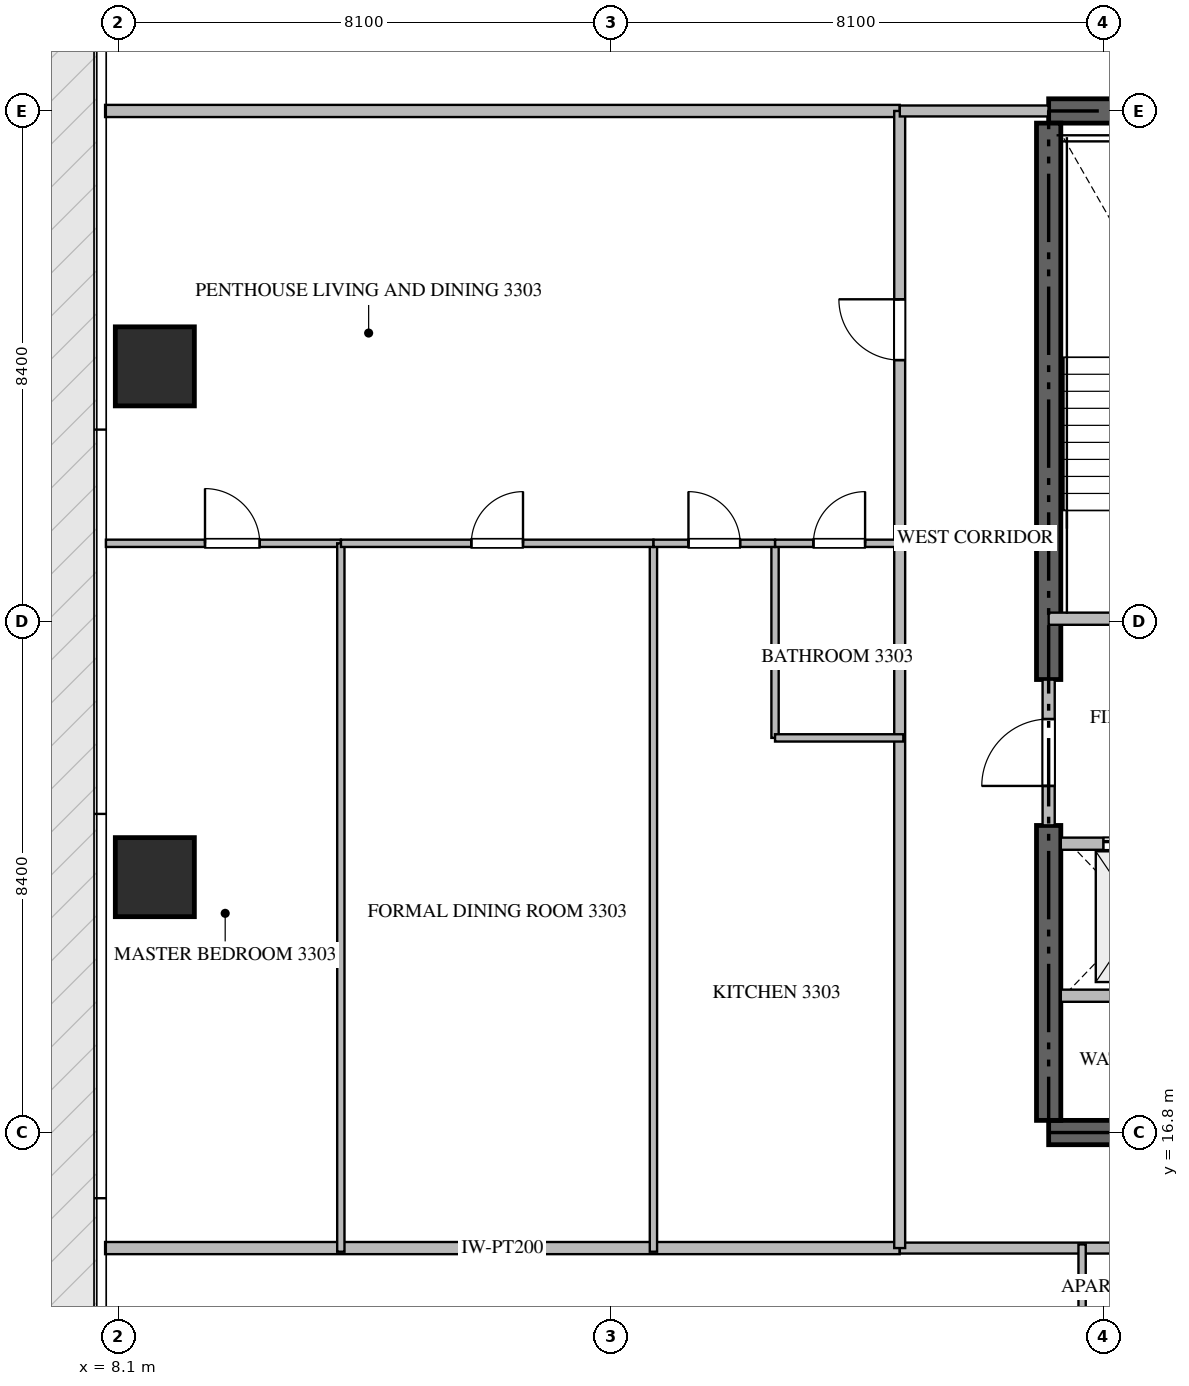
"""IFC4 building model, lengths in metres.
Left out: names, types, materials, properties, quantities, classifications, styles, units other than length and angle.
Written with IfcOpenShell. Run it as: python <this file> out.ifc"""

import sys

from ifc_helpers import new_model, si_unit, direction, frame, frame_2d, origin, origin_2d, place, context, subcontext, project, spatial, rectangle, extrude, source, transform, mapped, element, fill, save


model = new_model("IFC4")
c1 = context("Model", 3, precision=1e-05, world=origin(), true_north=direction((0.0, 1.0)))
c2 = subcontext(c1, "Body", "Model", "MODEL_VIEW")
j1 = project(units=[si_unit("LENGTHUNIT", "METRE"), si_unit("PLANEANGLEUNIT", "RADIAN")], contexts=[c1])
p1 = place(None, origin())
s1 = spatial("IfcSite", under=j1, at=p1, CompositionType="ELEMENT")
p2 = place(p1, origin())
s2 = spatial("IfcBuilding", under=s1, at=p2, CompositionType="ELEMENT")
p3 = place(p2, frame((0.0, 0.0, 135.15)))
s3 = spatial("IfcBuildingStorey", under=s2, at=p3, CompositionType="ELEMENT", Elevation=135.15)
for number, where, z_axis, x_axis in (
    (1, (23.4, 16.8, -0.26), (0.0, 0.0, 1.0), (1.0, 0.0, 0.0)),
    (2, (41.4, 33.6, -0.26), (0.0, 0.0, 1.0), (-1.0, 0.0, 0.0)),
):
    element("IfcWall", number, at=place(p3, frame(where, z_axis=z_axis, x_axis=x_axis)), inside=s3, PredefinedType="SHEAR", context=c2, shape_type="SweptSolid", body=[
        extrude(rectangle(XDim=18.0, YDim=0.4, at=frame_2d((9.0, 0.0))), origin(), (0.0, 0.0, 1.0), 3.748),
    ])
p4 = place(p3, frame((23.4, 17.0, -0.26), z_axis=(0.0, 0.0, 1.0), x_axis=(0.0, 1.0, 0.0)))
e3 = element("IfcWall", 3, at=p4, inside=s3, PredefinedType="SHEAR", context=c2, shape_type="SweptSolid", body=[
    extrude(rectangle(XDim=4.85, YDim=0.4, at=frame_2d((2.425, 0.0))), origin(), (0.0, 0.0, 1.0), 3.748),
])
p5 = place(p3, frame((23.4, 24.25, -0.26), z_axis=(0.0, 0.0, 1.0), x_axis=(0.0, 1.0, 0.0)))
e4 = element("IfcWall", 4, at=p5, inside=s3, PredefinedType="SHEAR", context=c2, shape_type="SweptSolid", body=[
    extrude(rectangle(XDim=9.15, YDim=0.4, at=frame_2d((4.575, 0.0))), origin(), (0.0, 0.0, 1.0), 3.748),
])
m1 = source(origin(), c2, "Body", "SweptSolid", [
    extrude(rectangle(XDim=1.3, YDim=1.3, at=origin_2d()), origin(), (0.0, 0.0, 1.0), 3.75),
])
for number, where, z_axis, x_axis in (
    (5, (8.7, 21.0, -0.26), (0.0, 0.0, 1.0), (1.0, 0.0, 0.0)),
    (6, (8.7, 29.4, -0.26), (0.0, 0.0, 1.0), (1.0, 0.0, 0.0)),
):
    element("IfcColumn", number, at=place(p3, frame(where, z_axis=z_axis, x_axis=x_axis)), inside=s3, PredefinedType="COLUMN", context=c2, shape_type="MappedRepresentation", body=[
        mapped(m1, transform((0.0, 0.0, 0.0), scale=1.0)),
    ])
p6 = place(p3, frame((23.4, 25.25, 0.0), z_axis=(0.0, 0.0, 1.0), x_axis=(1.0, 0.0, 0.0)))
e7 = element("IfcWall", 7, at=p6, inside=s3, PredefinedType="STANDARD", context=c2, shape_type="SweptSolid", body=[
    extrude(rectangle(XDim=4.45, YDim=0.2, at=frame_2d((2.225, 0.0))), origin(), (0.0, 0.0, 1.0), 3.49),
])
p7 = place(p6, frame((1.65, 0.0, 0.0)))
e8 = element("IfcOpeningElement", 8, at=p7, cuts=e7, PredefinedType="OPENING", context=c2, shape_type="SweptSolid", body=[
    extrude(rectangle(XDim=1.1, YDim=2.15, at=frame_2d((0.55, 1.075))), frame((0.0, 0.11, 0.0), z_axis=(0.0, -1.0, 0.0), x_axis=(1.0, 0.0, 0.0)), (0.0, 0.0, 1.0), 0.22),
])
p8 = place(p3, frame((23.6, 21.55, 0.0), z_axis=(0.0, 0.0, 1.0), x_axis=(1.0, 0.0, 0.0)))
e9 = element("IfcWall", 9, at=p8, inside=s3, PredefinedType="STANDARD", context=c2, shape_type="SweptSolid", body=[
    extrude(rectangle(XDim=2.45, YDim=0.2, at=frame_2d((1.225, 0.0))), origin(), (0.0, 0.0, 1.0), 3.49),
])
p9 = place(p8, frame((0.7, 0.0, 0.0)))
e10 = element("IfcOpeningElement", 10, at=p9, cuts=e9, PredefinedType="OPENING", context=c2, shape_type="SweptSolid", body=[
    extrude(rectangle(XDim=1.2, YDim=2.2, at=frame_2d((0.6, 1.1))), frame((0.0, 0.11, 0.0), z_axis=(0.0, -1.0, 0.0), x_axis=(1.0, 0.0, 0.0)), (0.0, 0.0, 1.0), 0.22),
])
p10 = place(p3, frame((23.6, 19.05, 0.0), z_axis=(0.0, 0.0, 1.0), x_axis=(1.0, 0.0, 0.0)))
e11 = element("IfcWall", 11, at=p10, inside=s3, PredefinedType="STANDARD", context=c2, shape_type="SweptSolid", body=[
    extrude(rectangle(XDim=2.45, YDim=0.2, at=frame_2d((1.225, 0.0))), origin(), (0.0, 0.0, 1.0), 3.49),
])
p11 = place(p3, frame((23.4, 21.852, 0.0), z_axis=(0.0, 0.0, 1.0), x_axis=(0.0, 1.0, 0.0)))
e12 = element("IfcWall", 12, at=p11, inside=s3, PredefinedType="STANDARD", context=c2, shape_type="SweptSolid", body=[
    extrude(rectangle(XDim=2.396, YDim=0.2, at=frame_2d((1.198, 0.0))), origin(), (0.0, 0.0, 1.0), 3.49),
])
p12 = place(p11, frame((0.648, 0.0, 0.0)))
e13 = element("IfcOpeningElement", 13, at=p12, cuts=e12, PredefinedType="OPENING", context=c2, shape_type="SweptSolid", body=[
    extrude(rectangle(XDim=1.1, YDim=2.15, at=frame_2d((0.55, 1.075))), frame((0.0, 0.11, 0.0), z_axis=(0.0, -1.0, 0.0), x_axis=(1.0, 0.0, 0.0)), (0.0, 0.0, 1.0), 0.22),
])
for number, where, z_axis, x_axis in (
    (14, (7.882, 14.9, 0.0), (0.0, 0.0, 1.0), (1.0, 0.0, 0.0)),
    (15, (7.882, 33.6, 0.0), (0.0, 0.0, 1.0), (1.0, 0.0, 0.0)),
):
    element("IfcWall", number, at=place(p3, frame(where, z_axis=z_axis, x_axis=x_axis)), inside=s3, PredefinedType="PARTITIONING", context=c2, shape_type="SweptSolid", body=[
        extrude(rectangle(XDim=13.068, YDim=0.2, at=frame_2d((6.534, 0.0))), origin(), (0.0, 0.0, 1.0), 3.49),
    ])
p13 = place(p3, frame((20.952, 14.9, 0.0), z_axis=(0.0, 0.0, 1.0), x_axis=(1.0, 0.0, 0.0)))
e16 = element("IfcWall", 16, at=p13, inside=s3, PredefinedType="PARTITIONING", context=c2, shape_type="SweptSolid", body=[
    extrude(rectangle(XDim=22.896, YDim=0.18, at=frame_2d((11.448, 0.0))), origin(), (0.0, 0.0, 1.0), 3.49),
])
p14 = place(p13, frame((15.809, 0.0, 0.0)))
e17 = element("IfcOpeningElement", 17, at=p14, cuts=e16, PredefinedType="OPENING", context=c2, shape_type="SweptSolid", body=[
    extrude(rectangle(XDim=1.0, YDim=2.15, at=frame_2d((0.5, 1.075))), frame((0.0, 0.1, 0.0), z_axis=(0.0, -1.0, 0.0), x_axis=(1.0, 0.0, 0.0)), (0.0, 0.0, 1.0), 0.2),
])
p15 = place(p3, frame((20.95, 14.9, 0.0), z_axis=(0.0, 0.0, 1.0), x_axis=(0.0, 1.0, 0.0)))
e18 = element("IfcWall", 18, at=p15, inside=s3, PredefinedType="PARTITIONING", context=c2, shape_type="SweptSolid", body=[
    extrude(rectangle(XDim=18.7, YDim=0.18, at=frame_2d((9.35, 0.0))), origin(), (0.0, 0.0, 1.0), 3.49),
])
p16 = place(p15, frame((14.603, 0.0, 0.0)))
e19 = element("IfcOpeningElement", 19, at=p16, cuts=e18, PredefinedType="OPENING", context=c2, shape_type="SweptSolid", body=[
    extrude(rectangle(XDim=1.0, YDim=2.15, at=frame_2d((0.5, 1.075))), frame((0.0, 0.1, 0.0), z_axis=(0.0, -1.0, 0.0), x_axis=(1.0, 0.0, 0.0)), (0.0, 0.0, 1.0), 0.2),
])
p17 = place(p3, frame((20.952, 33.6, 0.0), z_axis=(0.0, 0.0, 1.0), x_axis=(1.0, 0.0, 0.0)))
e20 = element("IfcWall", 20, at=p17, inside=s3, PredefinedType="PARTITIONING", context=c2, shape_type="SweptSolid", body=[
    extrude(rectangle(XDim=2.446, YDim=0.18, at=frame_2d((1.223, 0.0))), origin(), (0.0, 0.0, 1.0), 3.49),
])
p18 = place(p3, frame((23.95, 12.752, 0.0), z_axis=(0.0, 0.0, 1.0), x_axis=(0.0, 1.0, 0.0)))
e21 = element("IfcWall", 21, at=p18, inside=s3, PredefinedType="PARTITIONING", context=c2, shape_type="SweptSolid", body=[
    extrude(rectangle(XDim=2.208, YDim=0.12, at=frame_2d((1.104, 0.0))), origin(), (0.0, 0.0, 1.0), 3.49),
])
p19 = place(p3, frame((7.895, 26.49, 0.0), z_axis=(0.0, 0.0, 1.0), x_axis=(1.0, 0.0, 0.0)))
e22 = element("IfcWall", 22, at=p19, inside=s3, PredefinedType="PARTITIONING", context=c2, shape_type="SweptSolid", body=[
    extrude(rectangle(XDim=3.864, YDim=0.12, at=frame_2d((1.932, 0.0))), origin(), (0.0, 0.0, 1.0), 3.49),
])
p20 = place(p19, frame((1.63, 0.0, 0.0)))
e23 = element("IfcOpeningElement", 23, at=p20, cuts=e22, PredefinedType="OPENING", context=c2, shape_type="SweptSolid", body=[
    extrude(rectangle(XDim=0.9, YDim=2.1, at=frame_2d((0.45, 1.05))), frame((0.0, 0.07, 0.0), z_axis=(0.0, -1.0, 0.0), x_axis=(1.0, 0.0, 0.0)), (0.0, 0.0, 1.0), 0.14),
])
p21 = place(p3, frame((11.759, 14.84, 0.0), z_axis=(0.0, 0.0, 1.0), x_axis=(0.0, 1.0, 0.0)))
e24 = element("IfcWall", 24, at=p21, inside=s3, PredefinedType="PARTITIONING", context=c2, shape_type="SweptSolid", body=[
    extrude(rectangle(XDim=11.65, YDim=0.12, at=frame_2d((5.825, 0.0))), origin(), (0.0, 0.0, 1.0), 3.49),
])
p22 = place(p3, frame((16.9, 14.84, 0.0), z_axis=(0.0, 0.0, 1.0), x_axis=(0.0, 1.0, 0.0)))
e25 = element("IfcWall", 25, at=p22, inside=s3, PredefinedType="PARTITIONING", context=c2, shape_type="SweptSolid", body=[
    extrude(rectangle(XDim=11.65, YDim=0.12, at=frame_2d((5.825, 0.0))), origin(), (0.0, 0.0, 1.0), 2.972),
])
p23 = place(p3, frame((18.9, 23.29, 0.0), z_axis=(0.0, 0.0, 1.0), x_axis=(0.0, 1.0, 0.0)))
e26 = element("IfcWall", 26, at=p23, inside=s3, PredefinedType="PARTITIONING", context=c2, shape_type="SweptSolid", body=[
    extrude(rectangle(XDim=3.2, YDim=0.12, at=frame_2d((1.6, 0.0))), origin(), (0.0, 0.0, 1.0), 3.49),
])
p24 = place(p3, frame((18.9, 23.29, 0.0), z_axis=(0.0, 0.0, 1.0), x_axis=(1.0, 0.0, 0.0)))
e27 = element("IfcWall", 27, at=p24, inside=s3, PredefinedType="PARTITIONING", context=c2, shape_type="SweptSolid", body=[
    extrude(rectangle(XDim=2.11, YDim=0.12, at=frame_2d((1.055, 0.0))), origin(), (0.0, 0.0, 1.0), 3.49),
])
p25 = place(p3, frame((11.761, 26.49, 0.0), z_axis=(0.0, 0.0, 1.0), x_axis=(1.0, 0.0, 0.0)))
e28 = element("IfcWall", 28, at=p25, inside=s3, PredefinedType="PARTITIONING", context=c2, shape_type="SweptSolid", body=[
    extrude(rectangle(XDim=5.139, YDim=0.12, at=frame_2d((2.569, 0.0))), origin(), (0.0, 0.0, 1.0), 3.49),
])
p26 = place(p25, frame((2.144, 0.0, 0.0)))
e29 = element("IfcOpeningElement", 29, at=p26, cuts=e28, PredefinedType="OPENING", context=c2, shape_type="SweptSolid", body=[
    extrude(rectangle(XDim=0.85, YDim=2.1, at=frame_2d((0.425, 1.05))), frame((0.0, 0.07, 0.0), z_axis=(0.0, -1.0, 0.0), x_axis=(1.0, 0.0, 0.0)), (0.0, 0.0, 1.0), 0.14),
])
p27 = place(p3, frame((16.902, 26.49, 0.0), z_axis=(0.0, 0.0, 1.0), x_axis=(1.0, 0.0, 0.0)))
e30 = element("IfcWall", 30, at=p27, inside=s3, PredefinedType="PARTITIONING", context=c2, shape_type="SweptSolid", body=[
    extrude(rectangle(XDim=1.998, YDim=0.12, at=frame_2d((0.999, 0.0))), origin(), (0.0, 0.0, 1.0), 3.49),
])
p28 = place(p27, frame((0.574, 0.0, 0.0)))
e31 = element("IfcOpeningElement", 31, at=p28, cuts=e30, PredefinedType="OPENING", context=c2, shape_type="SweptSolid", body=[
    extrude(rectangle(XDim=0.85, YDim=2.1, at=frame_2d((0.425, 1.05))), frame((0.0, 0.07, 0.0), z_axis=(0.0, -1.0, 0.0), x_axis=(1.0, 0.0, 0.0)), (0.0, 0.0, 1.0), 0.14),
])
p29 = place(p3, frame((18.902, 26.49, 0.0), z_axis=(0.0, 0.0, 1.0), x_axis=(1.0, 0.0, 0.0)))
e32 = element("IfcWall", 32, at=p29, inside=s3, PredefinedType="PARTITIONING", context=c2, shape_type="SweptSolid", body=[
    extrude(rectangle(XDim=2.108, YDim=0.12, at=frame_2d((1.054, 0.0))), origin(), (0.0, 0.0, 1.0), 3.49),
])
p30 = place(p29, frame((0.629, 0.0, 0.0)))
e33 = element("IfcOpeningElement", 33, at=p30, cuts=e32, PredefinedType="OPENING", context=c2, shape_type="SweptSolid", body=[
    extrude(rectangle(XDim=0.85, YDim=2.1, at=frame_2d((0.425, 1.05))), frame((0.0, 0.07, 0.0), z_axis=(0.0, -1.0, 0.0), x_axis=(1.0, 0.0, 0.0)), (0.0, 0.0, 1.0), 0.14),
])
m2 = source(origin(), c2, "Body", "SweptSolid", [
    extrude(rectangle(XDim=1.2, YDim=2.2, at=frame_2d((0.6, 1.1))), frame((0.0, 0.025, 0.0), z_axis=(0.0, -1.0, 0.0), x_axis=(1.0, 0.0, 0.0)), (0.0, 0.0, 1.0), 0.05),
])
p31 = place(p9, origin())
e34 = element("IfcDoor", 34, at=p31, inside=s3, OperationType="DOUBLE_DOOR_SLIDING", PredefinedType="DOOR", context=c2, shape_type="MappedRepresentation", body=[
    mapped(m2, transform((0.0, 0.0, 0.0), scale=1.0)),
])
fill(e10, e34)
m3 = source(origin(), c2, "Body", "SweptSolid", [
    extrude(rectangle(XDim=1.1, YDim=2.15, at=frame_2d((0.55, 1.075))), frame((0.0, 0.025, 0.0), z_axis=(0.0, -1.0, 0.0), x_axis=(1.0, 0.0, 0.0)), (0.0, 0.0, 1.0), 0.05),
])
p32 = place(p12, origin())
e35 = element("IfcDoor", 35, at=p32, inside=s3, OperationType="SINGLE_SWING_LEFT", PredefinedType="DOOR", context=c2, shape_type="MappedRepresentation", body=[
    mapped(m3, transform((0.0, 0.0, 0.0), scale=1.0)),
])
fill(e13, e35)
m4 = source(origin(), c2, "Body", "SweptSolid", [
    extrude(rectangle(XDim=1.0, YDim=2.15, at=frame_2d((0.5, 1.075))), frame((0.0, 0.025, 0.0), z_axis=(0.0, -1.0, 0.0), x_axis=(1.0, 0.0, 0.0)), (0.0, 0.0, 1.0), 0.05),
])
p33 = place(p16, origin())
e36 = element("IfcDoor", 36, at=p33, inside=s3, OperationType="SINGLE_SWING_RIGHT", PredefinedType="DOOR", context=c2, shape_type="MappedRepresentation", body=[
    mapped(m4, transform((0.0, 0.0, 0.0), scale=1.0)),
])
fill(e19, e36)
m5 = source(origin(), c2, "Body", "SweptSolid", [
    extrude(rectangle(XDim=0.9, YDim=2.1, at=frame_2d((0.45, 1.05))), frame((0.0, 0.025, 0.0), z_axis=(0.0, -1.0, 0.0), x_axis=(1.0, 0.0, 0.0)), (0.0, 0.0, 1.0), 0.05),
])
p34 = place(p20, origin())
e37 = element("IfcDoor", 37, at=p34, inside=s3, OperationType="SINGLE_SWING_LEFT", PredefinedType="DOOR", context=c2, shape_type="MappedRepresentation", body=[
    mapped(m5, transform((0.0, 0.0, 0.0), scale=1.0)),
])
fill(e23, e37)
m6 = source(origin(), c2, "Body", "SweptSolid", [
    extrude(rectangle(XDim=0.85, YDim=2.1, at=frame_2d((0.425, 1.05))), frame((0.0, 0.025, 0.0), z_axis=(0.0, -1.0, 0.0), x_axis=(1.0, 0.0, 0.0)), (0.0, 0.0, 1.0), 0.05),
])
p35 = place(p26, origin())
e38 = element("IfcDoor", 38, at=p35, inside=s3, OperationType="SINGLE_SWING_RIGHT", PredefinedType="DOOR", context=c2, shape_type="MappedRepresentation", body=[
    mapped(m6, transform((0.0, 0.0, 0.0), scale=1.0)),
])
fill(e29, e38)
p36 = place(p28, origin())
e39 = element("IfcDoor", 39, at=p36, inside=s3, OperationType="SINGLE_SWING_LEFT", PredefinedType="DOOR", context=c2, shape_type="MappedRepresentation", body=[
    mapped(m6, transform((0.0, 0.0, 0.0), scale=1.0)),
])
fill(e31, e39)
p37 = place(p30, origin())
e40 = element("IfcDoor", 40, at=p37, inside=s3, OperationType="SINGLE_SWING_RIGHT", PredefinedType="DOOR", context=c2, shape_type="MappedRepresentation", body=[
    mapped(m6, transform((0.0, 0.0, 0.0), scale=1.0)),
])
fill(e33, e40)
save(model, sys.argv[1])
